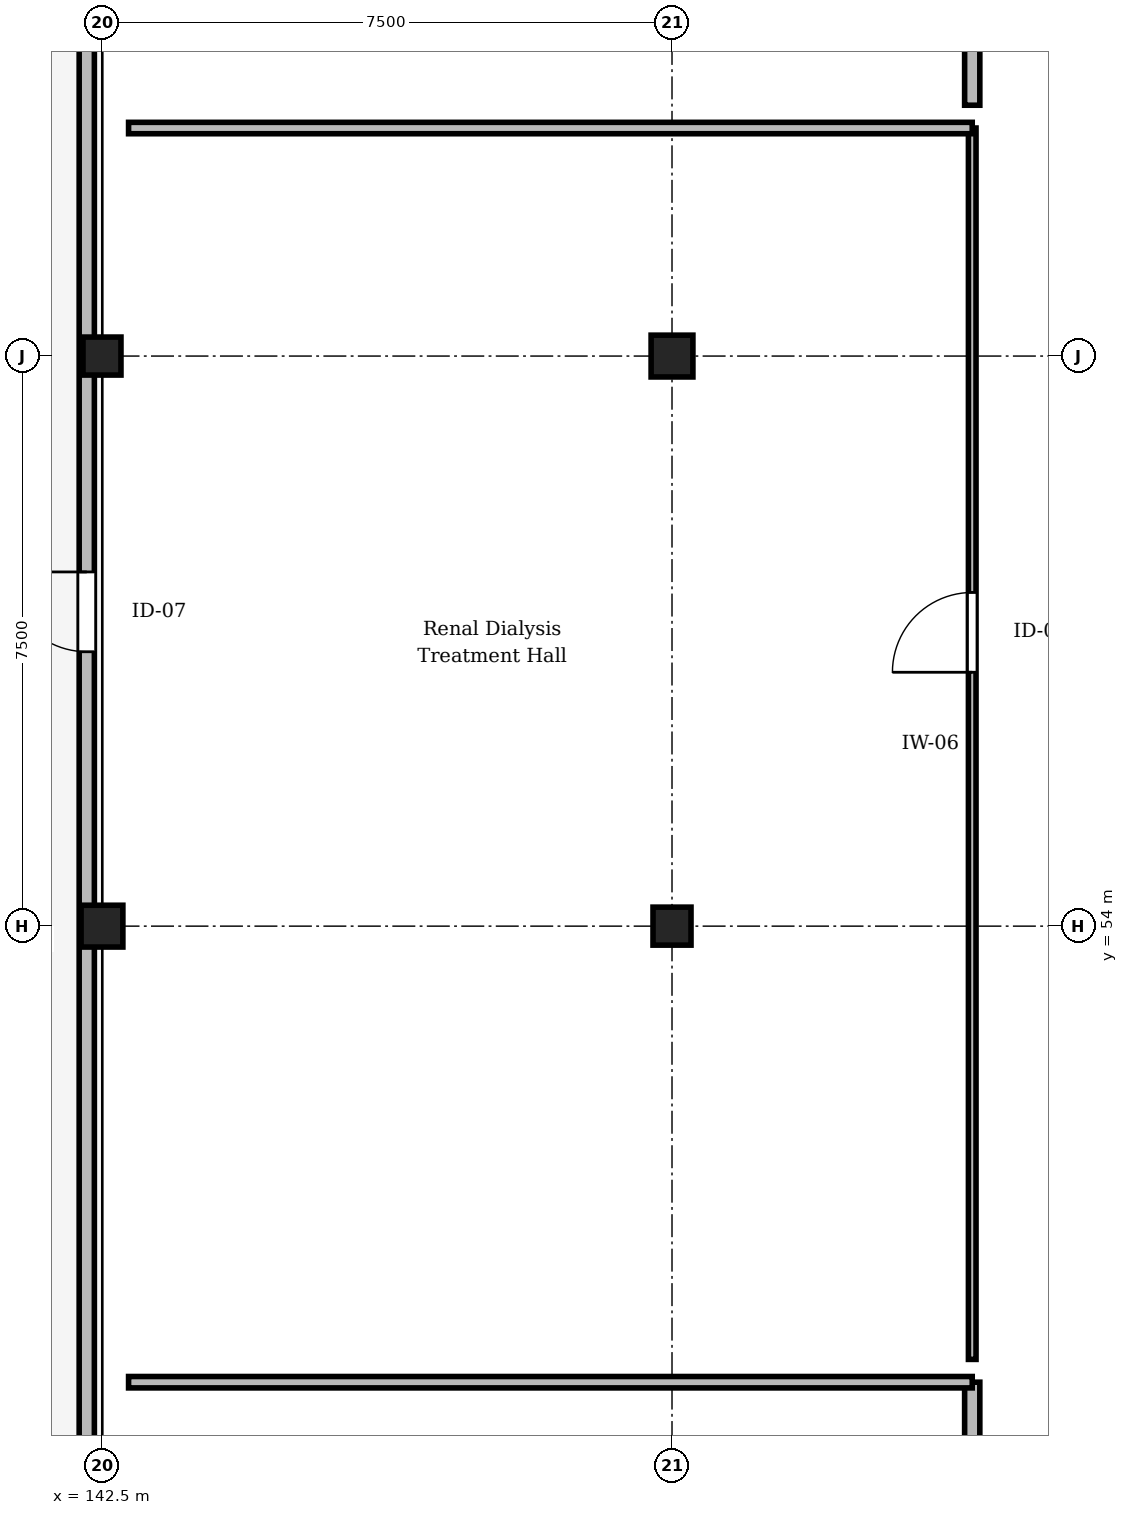
"""IFC4 building model, lengths in metres.
Left out: names, types, materials, properties, quantities, classifications, styles, units other than length and angle.
Written with IfcOpenShell. Run it as: python <this file> out.ifc"""

import sys

from ifc_helpers import new_model, si_unit, direction, frame, frame_2d, origin, origin_2d, place, context, subcontext, project, spatial, rectangle, extrude, element, fill, save


model = new_model("IFC4")
c1 = context("Model", 3, precision=1e-05, world=origin(), true_north=direction((0.0, 1.0)))
c2 = subcontext(c1, "Body", "Model", "MODEL_VIEW")
j1 = project(units=[si_unit("LENGTHUNIT", "METRE"), si_unit("PLANEANGLEUNIT", "RADIAN")], contexts=[c1])
p1 = place(None, origin())
s1 = spatial("IfcSite", under=j1, at=p1, CompositionType="ELEMENT")
p2 = place(p1, origin())
s2 = spatial("IfcBuilding", under=s1, at=p2, CompositionType="ELEMENT")
p3 = place(p2, frame((0.0, 0.0, 4.8)))
s3 = spatial("IfcBuildingStorey", under=s2, at=p3, CompositionType="ELEMENT", Elevation=4.8)
p4 = place(p3, frame((142.5, 54.0, 0.0), z_axis=(0.0, 0.0, 1.0), x_axis=(1.0, 0.0, 0.0)))
e1 = element("IfcColumn", 1, at=p4, inside=s3, PredefinedType="COLUMN", context=c2, shape_type="SweptSolid", body=[
    extrude(rectangle(XDim=0.55, YDim=0.55, at=origin_2d()), origin(), (0.0, 0.0, 1.0), 4.5),
])
for number, where, z_axis, x_axis in (
    (2, (142.5, 61.5, 0.0), (0.0, 0.0, 1.0), (1.0, 0.0, 0.0)),
    (3, (150.0, 54.0, 0.0), (0.0, 0.0, 1.0), (1.0, 0.0, 0.0)),
):
    element("IfcColumn", number, at=place(p3, frame(where, z_axis=z_axis, x_axis=x_axis)), inside=s3, PredefinedType="COLUMN", context=c2, shape_type="SweptSolid", body=[
        extrude(rectangle(XDim=0.5, YDim=0.5, at=origin_2d()), origin(), (0.0, 0.0, 1.0), 4.5),
    ])
p5 = place(p3, frame((150.0, 61.5, 0.0), z_axis=(0.0, 0.0, 1.0), x_axis=(1.0, 0.0, 0.0)))
e4 = element("IfcColumn", 4, at=p5, inside=s3, PredefinedType="COLUMN", context=c2, shape_type="SweptSolid", body=[
    extrude(rectangle(XDim=0.55, YDim=0.55, at=origin_2d()), origin(), (0.0, 0.0, 1.0), 4.5),
])
p6 = place(p3, frame((142.3, 31.5, 0.0), z_axis=(0.0, 0.0, 1.0), x_axis=(0.0, 1.0, 0.0)))
e5 = element("IfcWall", 5, at=p6, inside=s3, PredefinedType="STANDARD", context=c2, shape_type="SweptSolid", body=[
    extrude(rectangle(XDim=44.65, YDim=0.2, at=frame_2d((22.325, 0.0))), origin(), (0.0, 0.0, 1.0), 3.615),
])
p7 = place(p6, frame((26.11, 0.0, 0.0)))
e6 = element("IfcOpeningElement", 6, at=p7, cuts=e5, PredefinedType="OPENING", context=c2, shape_type="SweptSolid", body=[
    extrude(rectangle(XDim=1.05, YDim=2.2, at=frame_2d((0.525, 1.1))), frame((0.0, 0.11, 0.0), z_axis=(0.0, -1.0, 0.0), x_axis=(1.0, 0.0, 0.0)), (0.0, 0.0, 1.0), 0.22),
])
p8 = place(p3, frame((153.95, 31.85, 0.0), z_axis=(0.0, 0.0, 1.0), x_axis=(0.0, 1.0, 0.0)))
e7 = element("IfcWall", 7, at=p8, inside=s3, PredefinedType="STANDARD", context=c2, shape_type="SweptSolid", body=[
    extrude(rectangle(XDim=16.15, YDim=0.2, at=frame_2d((8.075, 0.0))), origin(), (0.0, 0.0, 1.0), 3.765),
])
p9 = place(p8, frame((10.47, 0.0, 0.0)))
e8 = element("IfcOpeningElement", 8, at=p9, cuts=e7, PredefinedType="OPENING", context=c2, shape_type="SweptSolid", body=[
    extrude(rectangle(XDim=1.05, YDim=2.2, at=frame_2d((0.525, 1.1))), frame((0.0, 0.11, 0.0), z_axis=(0.0, -1.0, 0.0), x_axis=(1.0, 0.0, 0.0)), (0.0, 0.0, 1.0), 0.22),
])
p10 = place(p3, frame((153.95, 48.3, 0.0), z_axis=(0.0, 0.0, 1.0), x_axis=(0.0, 1.0, 0.0)))
e9 = element("IfcWall", 9, at=p10, inside=s3, PredefinedType="PARTITIONING", context=c2, shape_type="SweptSolid", body=[
    extrude(rectangle(XDim=16.2, YDim=0.1, at=frame_2d((8.1, 0.0))), origin(), (0.0, 0.0, 1.0), 3.765),
])
p11 = place(p10, frame((9.04, 0.0, 0.0)))
e10 = element("IfcOpeningElement", 10, at=p11, cuts=e9, PredefinedType="OPENING", context=c2, shape_type="SweptSolid", body=[
    extrude(rectangle(XDim=1.05, YDim=2.2, at=frame_2d((0.525, 1.1))), frame((0.0, 0.06, 0.0), z_axis=(0.0, -1.0, 0.0), x_axis=(1.0, 0.0, 0.0)), (0.0, 0.0, 1.0), 0.12),
])
p12 = place(p3, frame((153.95, 64.8, 0.0), z_axis=(0.0, 0.0, 1.0), x_axis=(0.0, 1.0, 0.0)))
e11 = element("IfcWall", 11, at=p12, inside=s3, PredefinedType="STANDARD", context=c2, shape_type="SweptSolid", body=[
    extrude(rectangle(XDim=20.35, YDim=0.2, at=frame_2d((10.175, 0.0))), origin(), (0.0, 0.0, 1.0), 3.765),
])
p13 = place(p12, frame((15.29, 0.0, 0.0)))
e12 = element("IfcOpeningElement", 12, at=p13, cuts=e11, PredefinedType="OPENING", context=c2, shape_type="SweptSolid", body=[
    extrude(rectangle(XDim=1.05, YDim=2.2, at=frame_2d((0.525, 1.1))), frame((0.0, 0.11, 0.0), z_axis=(0.0, -1.0, 0.0), x_axis=(1.0, 0.0, 0.0)), (0.0, 0.0, 1.0), 0.22),
])
for number, where, z_axis, x_axis in (
    (13, (142.85, 48.0, 0.0), (0.0, 0.0, 1.0), (1.0, 0.0, 0.0)),
    (14, (142.85, 64.5, 0.0), (0.0, 0.0, 1.0), (1.0, 0.0, 0.0)),
):
    element("IfcWall", number, at=place(p3, frame(where, z_axis=z_axis, x_axis=x_axis)), inside=s3, PredefinedType="PARTITIONING", context=c2, shape_type="SweptSolid", body=[
        extrude(rectangle(XDim=11.1, YDim=0.15, at=frame_2d((5.55, 0.0))), origin(), (0.0, 0.0, 1.0), 4.165),
    ])
p14 = place(p7, origin())
e15 = element("IfcDoor", 15, at=p14, inside=s3, OperationType="SINGLE_SWING_RIGHT", PredefinedType="DOOR", context=c2, shape_type="SweptSolid", body=[
    extrude(rectangle(XDim=1.05, YDim=2.2, at=frame_2d((0.525, 1.1))), frame((0.0, 0.025, 0.0), z_axis=(0.0, -1.0, 0.0), x_axis=(1.0, 0.0, 0.0)), (0.0, 0.0, 1.0), 0.05),
])
fill(e6, e15)
p15 = place(p11, origin())
e16 = element("IfcDoor", 16, at=p15, inside=s3, OperationType="SINGLE_SWING_LEFT", PredefinedType="DOOR", context=c2, shape_type="SweptSolid", body=[
    extrude(rectangle(XDim=1.05, YDim=2.2, at=frame_2d((0.525, 1.1))), frame((0.0, 0.025, 0.0), z_axis=(0.0, -1.0, 0.0), x_axis=(1.0, 0.0, 0.0)), (0.0, 0.0, 1.0), 0.05),
])
fill(e10, e16)
save(model, sys.argv[1])
